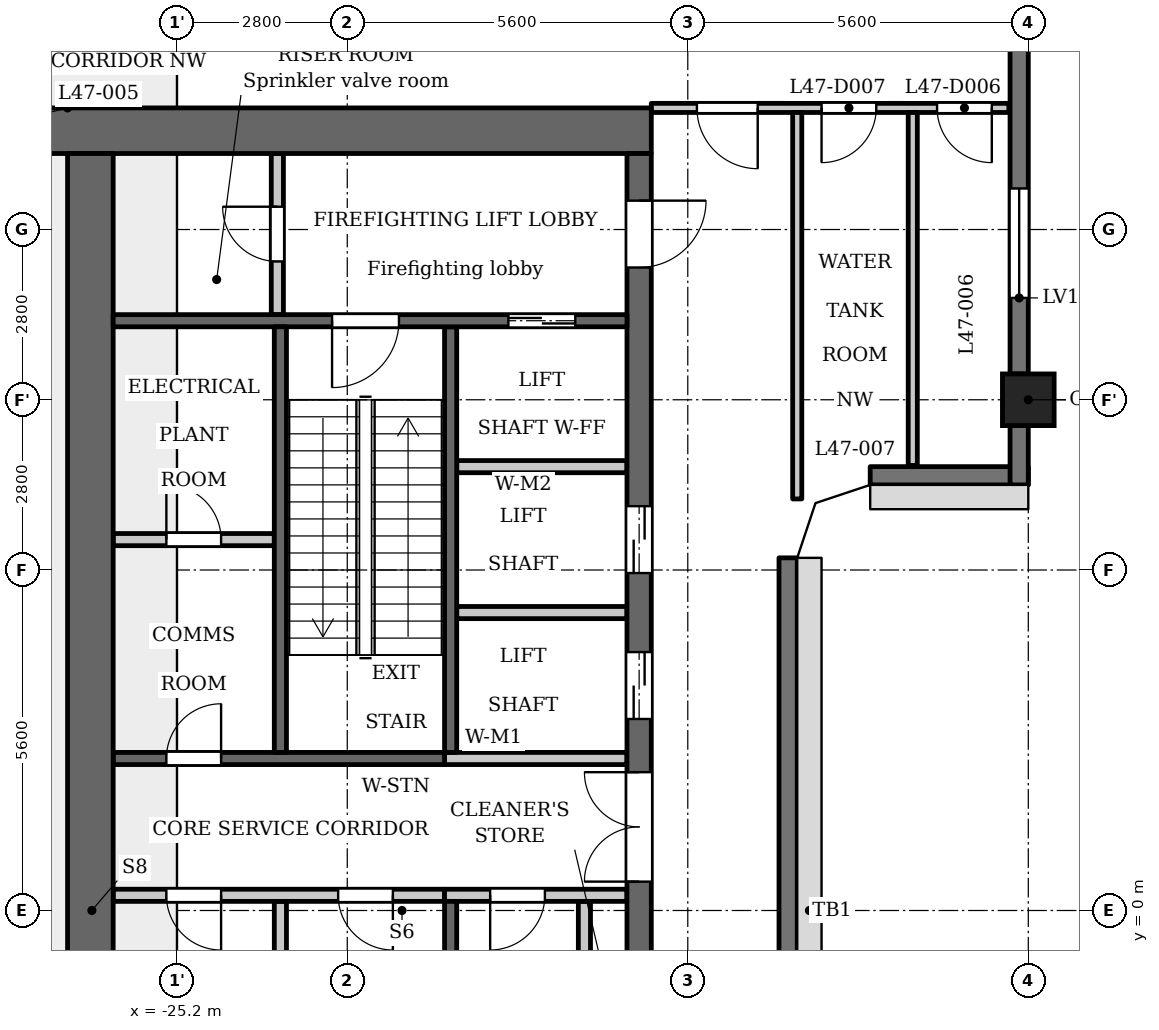
"""IFC4 building model, lengths in metres.
Left out: names, types, materials, properties, quantities, classifications, styles, units other than length and angle.
Written with IfcOpenShell. Run it as: python <this file> out.ifc"""

import sys

from ifc_helpers import new_model, si_unit, direction, frame, frame_2d, origin, origin_2d, place, context, subcontext, project, spatial, polyline, rectangle, outline, extrude, element, fill, save


model = new_model("IFC4")
c1 = context("Model", 3, precision=1e-05, world=origin(), true_north=direction((0.0, 1.0)))
c2 = subcontext(c1, "Body", "Model", "MODEL_VIEW")
j1 = project(units=[si_unit("LENGTHUNIT", "METRE"), si_unit("PLANEANGLEUNIT", "RADIAN")], contexts=[c1])
p1 = place(None, origin())
s1 = spatial("IfcSite", under=j1, at=p1, CompositionType="ELEMENT")
p2 = place(p1, origin())
s2 = spatial("IfcBuilding", under=s1, at=p2, CompositionType="ELEMENT")
p3 = place(p2, frame((0.0, 0.0, 183.5)))
s3 = spatial("IfcBuildingStorey", under=s2, at=p3, CompositionType="ELEMENT", Elevation=183.5)
p4 = place(p3, frame((-11.2, 8.4, 0.0), z_axis=(0.0, 0.0, 1.0), x_axis=(1.0, 0.0, 0.0)))
e1 = element("IfcColumn", 1, at=p4, inside=s3, PredefinedType="COLUMN", context=c2, shape_type="SweptSolid", body=[
    extrude(rectangle(XDim=0.85, YDim=0.85, at=origin_2d()), origin(), (0.0, 0.0, 1.0), 5.4),
])
p5 = place(p3, frame((-15.15, -5.8, 0.0), z_axis=(0.0, 0.0, 1.0), x_axis=(0.0, 1.0, 0.0)))
e2 = element("IfcWall", 2, at=p5, inside=s3, PredefinedType="SOLIDWALL", context=c2, shape_type="SweptSolid", body=[
    extrude(rectangle(XDim=11.6, YDim=0.3, at=frame_2d((5.8, 0.0))), origin(), (0.0, 0.0, 1.0), 4.6),
])
p6 = place(p3, frame((-13.8, 7.15, 0.0), z_axis=(0.0, 0.0, 1.0), x_axis=(1.0, 0.0, 0.0)))
e3 = element("IfcWall", 3, at=p6, inside=s3, PredefinedType="SOLIDWALL", context=c2, shape_type="SweptSolid", body=[
    extrude(rectangle(XDim=2.6, YDim=0.3, at=frame_2d((1.3, 0.0))), origin(), (0.0, 0.0, 1.0), 4.6),
])
p7 = place(p3, frame((-11.35, 7.0, 0.0), z_axis=(0.0, 0.0, 1.0), x_axis=(0.0, 1.0, 0.0)))
e4 = element("IfcWall", 4, at=p7, inside=s3, PredefinedType="SOLIDWALL", context=c2, shape_type="SweptSolid", body=[
    extrude(rectangle(XDim=0.975, YDim=0.3, at=frame_2d((0.488, 0.0))), origin(), (0.0, 0.0, 1.0), 4.6),
])
p8 = place(p3, frame((-11.35, 8.825, 0.0), z_axis=(0.0, 0.0, 1.0), x_axis=(0.0, 1.0, 0.0)))
e5 = element("IfcWall", 5, at=p8, inside=s3, PredefinedType="SOLIDWALL", context=c2, shape_type="SweptSolid", body=[
    extrude(rectangle(XDim=6.2, YDim=0.3, at=frame_2d((3.1, 0.0))), origin(), (0.0, 0.0, 1.0), 4.6),
])
p9 = place(p8, frame((1.25, 0.0, 0.9)))
e6 = element("IfcOpeningElement", 6, at=p9, cuts=e5, PredefinedType="OPENING", context=c2, shape_type="SweptSolid", body=[
    extrude(rectangle(XDim=1.8, YDim=1.5, at=frame_2d((0.9, 0.75))), frame((0.0, 0.16, 0.0), z_axis=(0.0, -1.0, 0.0), x_axis=(1.0, 0.0, 0.0)), (0.0, 0.0, 1.0), 0.32),
])
p10 = place(p3, frame((-23.5, -2.5, 0.0), z_axis=(0.0, 0.0, 1.0), x_axis=(0.0, 1.0, 0.0)))
e7 = element("IfcWall", 7, at=p10, inside=s3, PredefinedType="PARTITIONING", context=c2, shape_type="SweptSolid", body=[
    extrude(rectangle(XDim=2.65, YDim=0.2, at=frame_2d((1.325, 0.0))), origin(), (0.0, 0.0, 1.0), 4.6),
])
p11 = place(p3, frame((-20.7, 2.6, 0.0), z_axis=(0.0, 0.0, 1.0), x_axis=(0.0, 1.0, 0.0)))
e8 = element("IfcWall", 8, at=p11, inside=s3, PredefinedType="SHEAR", context=c2, shape_type="SweptSolid", body=[
    extrude(rectangle(XDim=7.0, YDim=0.2, at=frame_2d((3.5, 0.0))), origin(), (0.0, 0.0, 1.0), 4.6),
])
p12 = place(p3, frame((-20.7, -9.6, 0.0), z_axis=(0.0, 0.0, 1.0), x_axis=(0.0, 1.0, 0.0)))
e9 = element("IfcWall", 9, at=p12, inside=s3, PredefinedType="SHEAR", context=c2, shape_type="SweptSolid", body=[
    extrude(rectangle(XDim=9.75, YDim=0.2, at=frame_2d((4.875, 0.0))), origin(), (0.0, 0.0, 1.0), 4.6),
])
p13 = place(p3, frame((-20.8, 2.5, 0.0), z_axis=(0.0, 0.0, 1.0), x_axis=(-1.0, 0.0, 0.0)))
e10 = element("IfcWall", 10, at=p13, inside=s3, PredefinedType="SHEAR", context=c2, shape_type="SweptSolid", body=[
    extrude(rectangle(XDim=5.45, YDim=0.2, at=frame_2d((2.725, 0.0))), origin(), (0.0, 0.0, 1.0), 4.6),
])
p14 = place(p13, frame((3.675, 0.0, 0.0)))
e11 = element("IfcOpeningElement", 11, at=p14, cuts=e10, PredefinedType="OPENING", context=c2, shape_type="SweptSolid", body=[
    extrude(rectangle(XDim=0.9, YDim=2.1, at=frame_2d((0.45, 1.05))), frame((0.0, 0.11, 0.0), z_axis=(0.0, -1.0, 0.0), x_axis=(1.0, 0.0, 0.0)), (0.0, 0.0, 1.0), 0.22),
])
p15 = place(p3, frame((-20.8, 0.25, 0.0), z_axis=(0.0, 0.0, 1.0), x_axis=(-1.0, 0.0, 0.0)))
e12 = element("IfcWall", 12, at=p15, inside=s3, PredefinedType="PARTITIONING", context=c2, shape_type="SweptSolid", body=[
    extrude(rectangle(XDim=5.45, YDim=0.2, at=frame_2d((2.725, 0.0))), origin(), (0.0, 0.0, 1.0), 4.6),
])
p16 = place(p15, frame((0.85, 0.0, 0.0)))
e13 = element("IfcOpeningElement", 13, at=p16, cuts=e12, PredefinedType="OPENING", context=c2, shape_type="SweptSolid", body=[
    extrude(rectangle(XDim=0.9, YDim=2.1, at=frame_2d((0.45, 1.05))), frame((0.0, 0.11, 0.0), z_axis=(0.0, -1.0, 0.0), x_axis=(1.0, 0.0, 0.0)), (0.0, 0.0, 1.0), 0.22),
])
p17 = place(p15, frame((3.675, 0.0, 0.0)))
e14 = element("IfcOpeningElement", 14, at=p17, cuts=e12, PredefinedType="OPENING", context=c2, shape_type="SweptSolid", body=[
    extrude(rectangle(XDim=0.9, YDim=2.1, at=frame_2d((0.45, 1.05))), frame((0.0, 0.11, 0.0), z_axis=(0.0, -1.0, 0.0), x_axis=(1.0, 0.0, 0.0)), (0.0, 0.0, 1.0), 0.22),
])
p18 = place(p3, frame((-17.4, 12.825, 0.0), z_axis=(0.0, 0.0, 1.0), x_axis=(-1.0, 0.0, 0.0)))
e15 = element("IfcWall", 15, at=p18, inside=s3, PredefinedType="SHEAR", context=c2, shape_type="SweptSolid", body=[
    extrude(rectangle(XDim=10.4, YDim=0.75, at=frame_2d((5.2, 0.0))), origin(), (0.0, 0.0, 1.0), 4.6),
])
p19 = place(p3, frame((-18.5, -6.85, 0.0), z_axis=(0.0, 0.0, 1.0), x_axis=(0.0, 1.0, 0.0)))
e16 = element("IfcWall", 16, at=p19, inside=s3, PredefinedType="PARTITIONING", context=c2, shape_type="SweptSolid", body=[
    extrude(rectangle(XDim=7.0, YDim=0.2, at=frame_2d((3.5, 0.0))), origin(), (0.0, 0.0, 1.0), 4.6),
])
p20 = place(p3, frame((-17.6, -12.45, 0.0), z_axis=(0.0, 0.0, 1.0), x_axis=(0.0, 1.0, 0.0)))
e17 = element("IfcWall", 17, at=p20, inside=s3, PredefinedType="SHEAR", context=c2, shape_type="SweptSolid", body=[
    extrude(rectangle(XDim=24.9, YDim=0.4, at=frame_2d((12.45, 0.0))), origin(), (0.0, 0.0, 1.0), 4.6),
])
p21 = place(p20, frame((8.65, 0.0, 0.0)))
e18 = element("IfcOpeningElement", 18, at=p21, cuts=e17, PredefinedType="OPENING", context=c2, shape_type="SweptSolid", body=[
    extrude(rectangle(XDim=0.9, YDim=2.1, at=frame_2d((0.45, 1.05))), frame((0.0, 0.21, 0.0), z_axis=(0.0, -1.0, 0.0), x_axis=(1.0, 0.0, 0.0)), (0.0, 0.0, 1.0), 0.42),
])
p22 = place(p20, frame((15.6, 0.0, 0.0)))
e19 = element("IfcOpeningElement", 19, at=p22, cuts=e17, PredefinedType="OPENING", context=c2, shape_type="SweptSolid", body=[
    extrude(rectangle(XDim=1.1, YDim=2.1, at=frame_2d((0.55, 1.05))), frame((0.0, 0.21, 0.0), z_axis=(0.0, -1.0, 0.0), x_axis=(1.0, 0.0, 0.0)), (0.0, 0.0, 1.0), 0.42),
])
p23 = place(p20, frame((18.0, 0.0, 0.0)))
e20 = element("IfcOpeningElement", 20, at=p23, cuts=e17, PredefinedType="OPENING", context=c2, shape_type="SweptSolid", body=[
    extrude(rectangle(XDim=1.1, YDim=2.1, at=frame_2d((0.55, 1.05))), frame((0.0, 0.21, 0.0), z_axis=(0.0, -1.0, 0.0), x_axis=(1.0, 0.0, 0.0)), (0.0, 0.0, 1.0), 0.42),
])
p24 = place(p20, frame((23.025, 0.0, 0.0)))
e21 = element("IfcOpeningElement", 21, at=p24, cuts=e17, PredefinedType="OPENING", context=c2, shape_type="SweptSolid", body=[
    extrude(rectangle(XDim=1.1, YDim=2.1, at=frame_2d((0.55, 1.05))), frame((0.0, 0.21, 0.0), z_axis=(0.0, -1.0, 0.0), x_axis=(1.0, 0.0, 0.0)), (0.0, 0.0, 1.0), 0.42),
])
p25 = place(p20, frame((0.775, 0.0, 0.0)))
e22 = element("IfcOpeningElement", 22, at=p25, cuts=e17, PredefinedType="OPENING", context=c2, shape_type="SweptSolid", body=[
    extrude(rectangle(XDim=1.1, YDim=2.1, at=frame_2d((0.55, 1.05))), frame((0.0, 0.21, 0.0), z_axis=(0.0, -1.0, 0.0), x_axis=(1.0, 0.0, 0.0)), (0.0, 0.0, 1.0), 0.42),
])
p26 = place(p20, frame((12.925, 0.0, 0.0)))
e23 = element("IfcOpeningElement", 23, at=p26, cuts=e17, PredefinedType="OPENING", context=c2, shape_type="SweptSolid", body=[
    extrude(rectangle(XDim=1.8, YDim=2.1, at=frame_2d((0.9, 1.05))), frame((0.0, 0.21, 0.0), z_axis=(0.0, -1.0, 0.0), x_axis=(1.0, 0.0, 0.0)), (0.0, 0.0, 1.0), 0.42),
])
p27 = place(p3, frame((-26.625, -12.45, 0.0), z_axis=(0.0, 0.0, 1.0), x_axis=(0.0, 1.0, 0.0)))
e24 = element("IfcWall", 24, at=p27, inside=s3, PredefinedType="SHEAR", context=c2, shape_type="SweptSolid", body=[
    extrude(rectangle(XDim=24.9, YDim=0.75, at=frame_2d((12.45, 0.0))), origin(), (0.0, 0.0, 1.0), 4.6),
])
p28 = place(p3, frame((-23.55, 9.8, 0.0), z_axis=(0.0, 0.0, 1.0), x_axis=(0.0, 1.0, 0.0)))
e25 = element("IfcWall", 25, at=p28, inside=s3, PredefinedType="PARTITIONING", context=c2, shape_type="SweptSolid", body=[
    extrude(rectangle(XDim=2.65, YDim=0.2, at=frame_2d((1.325, 0.0))), origin(), (0.0, 0.0, 1.0), 4.6),
])
p29 = place(p28, frame((0.875, 0.0, 0.0)))
e26 = element("IfcOpeningElement", 26, at=p29, cuts=e25, PredefinedType="OPENING", context=c2, shape_type="SweptSolid", body=[
    extrude(rectangle(XDim=0.9, YDim=2.1, at=frame_2d((0.45, 1.05))), frame((0.0, 0.11, 0.0), z_axis=(0.0, -1.0, 0.0), x_axis=(1.0, 0.0, 0.0)), (0.0, 0.0, 1.0), 0.22),
])
p30 = place(p3, frame((-23.6, 6.1, 0.0), z_axis=(0.0, 0.0, 1.0), x_axis=(-1.0, 0.0, 0.0)))
e27 = element("IfcWall", 27, at=p30, inside=s3, PredefinedType="PARTITIONING", context=c2, shape_type="SweptSolid", body=[
    extrude(rectangle(XDim=2.65, YDim=0.2, at=frame_2d((1.325, 0.0))), origin(), (0.0, 0.0, 1.0), 4.6),
])
p31 = place(p30, frame((0.875, 0.0, 0.0)))
e28 = element("IfcOpeningElement", 28, at=p31, cuts=e27, PredefinedType="OPENING", context=c2, shape_type="SweptSolid", body=[
    extrude(rectangle(XDim=0.9, YDim=2.1, at=frame_2d((0.45, 1.05))), frame((0.0, 0.11, 0.0), z_axis=(0.0, -1.0, 0.0), x_axis=(1.0, 0.0, 0.0)), (0.0, 0.0, 1.0), 0.22),
])
p32 = place(p3, frame((-17.8, 0.25, 0.0), z_axis=(0.0, 0.0, 1.0), x_axis=(-1.0, 0.0, 0.0)))
e29 = element("IfcWall", 29, at=p32, inside=s3, PredefinedType="PARTITIONING", context=c2, shape_type="SweptSolid", body=[
    extrude(rectangle(XDim=3.0, YDim=0.2, at=frame_2d((1.5, 0.0))), origin(), (0.0, 0.0, 1.0), 4.6),
])
p33 = place(p32, frame((1.35, 0.0, 0.0)))
e30 = element("IfcOpeningElement", 30, at=p33, cuts=e29, PredefinedType="OPENING", context=c2, shape_type="SweptSolid", body=[
    extrude(rectangle(XDim=0.9, YDim=2.1, at=frame_2d((0.45, 1.05))), frame((0.0, 0.11, 0.0), z_axis=(0.0, -1.0, 0.0), x_axis=(1.0, 0.0, 0.0)), (0.0, 0.0, 1.0), 0.22),
])
p34 = place(p3, frame((-17.8, 2.5, 0.0), z_axis=(0.0, 0.0, 1.0), x_axis=(-1.0, 0.0, 0.0)))
e31 = element("IfcWall", 31, at=p34, inside=s3, PredefinedType="PARTITIONING", context=c2, shape_type="SweptSolid", body=[
    extrude(rectangle(XDim=3.0, YDim=0.2, at=frame_2d((1.5, 0.0))), origin(), (0.0, 0.0, 1.0), 4.6),
])
for number, where, z_axis, x_axis in (
    (32, (-17.8, 4.9, 0.0), (0.0, 0.0, 1.0), (-1.0, 0.0, 0.0)),
    (33, (-17.8, 7.3, 0.0), (0.0, 0.0, 1.0), (-1.0, 0.0, 0.0)),
):
    element("IfcWall", number, at=place(p3, frame(where, z_axis=z_axis, x_axis=x_axis)), inside=s3, PredefinedType="PARTITIONING", context=c2, shape_type="SweptSolid", body=[
        extrude(rectangle(XDim=2.8, YDim=0.2, at=frame_2d((1.4, 0.0))), origin(), (0.0, 0.0, 1.0), 4.6),
    ])
p35 = place(p3, frame((-17.8, 9.7, 0.0), z_axis=(0.0, 0.0, 1.0), x_axis=(-1.0, 0.0, 0.0)))
e34 = element("IfcWall", 34, at=p35, inside=s3, PredefinedType="SHEAR", context=c2, shape_type="SweptSolid", body=[
    extrude(rectangle(XDim=8.45, YDim=0.2, at=frame_2d((4.225, 0.0))), origin(), (0.0, 0.0, 1.0), 4.6),
])
p36 = place(p35, frame((0.85, 0.0, 0.0)))
e35 = element("IfcOpeningElement", 35, at=p36, cuts=e34, PredefinedType="OPENING", context=c2, shape_type="SweptSolid", body=[
    extrude(rectangle(XDim=1.1, YDim=2.1, at=frame_2d((0.55, 1.05))), frame((0.0, 0.11, 0.0), z_axis=(0.0, -1.0, 0.0), x_axis=(1.0, 0.0, 0.0)), (0.0, 0.0, 1.0), 0.22),
])
p37 = place(p35, frame((3.75, 0.0, 0.0)))
e36 = element("IfcOpeningElement", 36, at=p37, cuts=e34, PredefinedType="OPENING", context=c2, shape_type="SweptSolid", body=[
    extrude(rectangle(XDim=1.1, YDim=2.1, at=frame_2d((0.55, 1.05))), frame((0.0, 0.11, 0.0), z_axis=(0.0, -1.0, 0.0), x_axis=(1.0, 0.0, 0.0)), (0.0, 0.0, 1.0), 0.22),
])
p38 = place(p3, frame((-23.5, 2.6, 0.0), z_axis=(0.0, 0.0, 1.0), x_axis=(0.0, 1.0, 0.0)))
e37 = element("IfcWall", 37, at=p38, inside=s3, PredefinedType="SHEAR", context=c2, shape_type="SweptSolid", body=[
    extrude(rectangle(XDim=7.0, YDim=0.2, at=frame_2d((3.5, 0.0))), origin(), (0.0, 0.0, 1.0), 4.6),
])
p39 = place(p3, frame((-17.4, 13.2, 0.0), z_axis=(0.0, 0.0, 1.0), x_axis=(1.0, 0.0, 0.0)))
e38 = element("IfcWall", 38, at=p39, inside=s3, PredefinedType="PARTITIONING", context=c2, shape_type="SweptSolid", body=[
    extrude(rectangle(XDim=5.88, YDim=0.15, at=frame_2d((2.94, 0.0))), origin(), (0.0, 0.0, 1.0), 4.6),
])
p40 = place(p39, frame((0.75, 0.0, 0.0)))
e39 = element("IfcOpeningElement", 39, at=p40, cuts=e38, PredefinedType="OPENING", context=c2, shape_type="SweptSolid", body=[
    extrude(rectangle(XDim=1.0, YDim=2.1, at=frame_2d((0.5, 1.05))), frame((0.0, 0.085, 0.0), z_axis=(0.0, -1.0, 0.0), x_axis=(1.0, 0.0, 0.0)), (0.0, 0.0, 1.0), 0.17),
])
p41 = place(p39, frame((4.7, 0.0, 0.0)))
e40 = element("IfcOpeningElement", 40, at=p41, cuts=e38, PredefinedType="OPENING", context=c2, shape_type="SweptSolid", body=[
    extrude(rectangle(XDim=0.9, YDim=2.1, at=frame_2d((0.45, 1.05))), frame((0.0, 0.085, 0.0), z_axis=(0.0, -1.0, 0.0), x_axis=(1.0, 0.0, 0.0)), (0.0, 0.0, 1.0), 0.17),
])
p42 = place(p39, frame((2.8, 0.0, 0.0)))
e41 = element("IfcOpeningElement", 41, at=p42, cuts=e38, PredefinedType="OPENING", context=c2, shape_type="SweptSolid", body=[
    extrude(rectangle(XDim=0.9, YDim=2.1, at=frame_2d((0.45, 1.05))), frame((0.0, 0.085, 0.0), z_axis=(0.0, -1.0, 0.0), x_axis=(1.0, 0.0, 0.0)), (0.0, 0.0, 1.0), 0.17),
])
p43 = place(p3, frame((-15.0, 6.769, 0.0), z_axis=(0.0, 0.0, 1.0), x_axis=(0.0, 1.0, 0.0)))
e42 = element("IfcWall", 42, at=p43, inside=s3, PredefinedType="PARTITIONING", context=c2, shape_type="SweptSolid", body=[
    extrude(rectangle(XDim=6.356, YDim=0.15, at=frame_2d((3.178, 0.0))), origin(), (0.0, 0.0, 1.0), 4.6),
])
p44 = place(p3, frame((-13.1, 7.32, 0.0), z_axis=(0.0, 0.0, 1.0), x_axis=(0.0, 1.0, 0.0)))
e43 = element("IfcWall", 43, at=p44, inside=s3, PredefinedType="PARTITIONING", context=c2, shape_type="SweptSolid", body=[
    extrude(rectangle(XDim=5.805, YDim=0.15, at=frame_2d((2.902, 0.0))), origin(), (0.0, 0.0, 1.0), 4.6),
])
p45 = place(p3, origin())
e44 = element("IfcWall", 44, at=p45, inside=s3, PredefinedType="SOLIDWALL", context=c2, shape_type="SweptSolid", body=[
    extrude(outline(polyline([(-15.0, 5.8), (-14.7, 6.7), (-13.8, 7.0), (-13.8, 7.3), (-13.849, 7.3), (-14.937, 6.937), (-15.3, 5.849), (-15.3, 5.8), (-15.0, 5.8)])), origin(), (0.0, 0.0, 1.0), 4.6),
])
p46 = place(p33, origin())
e45 = element("IfcDoor", 45, at=p46, inside=s3, OperationType="SINGLE_SWING_LEFT", PredefinedType="DOOR", context=c2, shape_type="SweptSolid", body=[
    extrude(rectangle(XDim=0.9, YDim=2.1, at=frame_2d((0.45, 1.05))), frame((0.0, 0.025, 0.0), z_axis=(0.0, -1.0, 0.0), x_axis=(1.0, 0.0, 0.0)), (0.0, 0.0, 1.0), 0.05),
])
fill(e30, e45)
p47 = place(p22, origin())
e46 = element("IfcDoor", 46, at=p47, inside=s3, OperationType="DOUBLE_DOOR_SLIDING", PredefinedType="DOOR", context=c2, shape_type="SweptSolid", body=[
    extrude(rectangle(XDim=1.1, YDim=2.1, at=frame_2d((0.55, 1.05))), frame((0.0, 0.025, 0.0), z_axis=(0.0, -1.0, 0.0), x_axis=(1.0, 0.0, 0.0)), (0.0, 0.0, 1.0), 0.05),
])
fill(e19, e46)
p48 = place(p23, origin())
e47 = element("IfcDoor", 47, at=p48, inside=s3, OperationType="DOUBLE_DOOR_SLIDING", PredefinedType="DOOR", context=c2, shape_type="SweptSolid", body=[
    extrude(rectangle(XDim=1.1, YDim=2.1, at=frame_2d((0.55, 1.05))), frame((0.0, 0.025, 0.0), z_axis=(0.0, -1.0, 0.0), x_axis=(1.0, 0.0, 0.0)), (0.0, 0.0, 1.0), 0.05),
])
fill(e20, e47)
p49 = place(p36, origin())
e48 = element("IfcDoor", 48, at=p49, inside=s3, OperationType="DOUBLE_DOOR_SLIDING", PredefinedType="DOOR", context=c2, shape_type="SweptSolid", body=[
    extrude(rectangle(XDim=1.1, YDim=2.1, at=frame_2d((0.55, 1.05))), frame((0.0, 0.025, 0.0), z_axis=(0.0, -1.0, 0.0), x_axis=(1.0, 0.0, 0.0)), (0.0, 0.0, 1.0), 0.05),
])
fill(e35, e48)
p50 = place(p24, origin())
e49 = element("IfcDoor", 49, at=p50, inside=s3, OperationType="SINGLE_SWING_RIGHT", PredefinedType="DOOR", context=c2, shape_type="SweptSolid", body=[
    extrude(rectangle(XDim=1.1, YDim=2.1, at=frame_2d((0.55, 1.05))), frame((0.0, 0.025, 0.0), z_axis=(0.0, -1.0, 0.0), x_axis=(1.0, 0.0, 0.0)), (0.0, 0.0, 1.0), 0.05),
])
fill(e21, e49)
p51 = place(p29, origin())
e50 = element("IfcDoor", 50, at=p51, inside=s3, OperationType="SINGLE_SWING_LEFT", PredefinedType="DOOR", context=c2, shape_type="SweptSolid", body=[
    extrude(rectangle(XDim=0.9, YDim=2.1, at=frame_2d((0.45, 1.05))), frame((0.0, 0.025, 0.0), z_axis=(0.0, -1.0, 0.0), x_axis=(1.0, 0.0, 0.0)), (0.0, 0.0, 1.0), 0.05),
])
fill(e26, e50)
p52 = place(p37, origin())
e51 = element("IfcDoor", 51, at=p52, inside=s3, OperationType="SINGLE_SWING_LEFT", PredefinedType="DOOR", context=c2, shape_type="SweptSolid", body=[
    extrude(rectangle(XDim=1.1, YDim=2.1, at=frame_2d((0.55, 1.05))), frame((0.0, 0.025, 0.0), z_axis=(0.0, -1.0, 0.0), x_axis=(1.0, 0.0, 0.0)), (0.0, 0.0, 1.0), 0.05),
])
fill(e36, e51)
p53 = place(p26, origin())
e52 = element("IfcDoor", 52, at=p53, inside=s3, OperationType="DOUBLE_DOOR_SINGLE_SWING", PredefinedType="DOOR", context=c2, shape_type="SweptSolid", body=[
    extrude(rectangle(XDim=1.8, YDim=2.1, at=frame_2d((0.9, 1.05))), frame((0.0, 0.025, 0.0), z_axis=(0.0, -1.0, 0.0), x_axis=(1.0, 0.0, 0.0)), (0.0, 0.0, 1.0), 0.05),
])
fill(e23, e52)
p54 = place(p16, origin())
e53 = element("IfcDoor", 53, at=p54, inside=s3, OperationType="SINGLE_SWING_RIGHT", PredefinedType="DOOR", context=c2, shape_type="SweptSolid", body=[
    extrude(rectangle(XDim=0.9, YDim=2.1, at=frame_2d((0.45, 1.05))), frame((0.0, 0.025, 0.0), z_axis=(0.0, -1.0, 0.0), x_axis=(1.0, 0.0, 0.0)), (0.0, 0.0, 1.0), 0.05),
])
fill(e13, e53)
p55 = place(p17, origin())
e54 = element("IfcDoor", 54, at=p55, inside=s3, OperationType="SINGLE_SWING_RIGHT", PredefinedType="DOOR", context=c2, shape_type="SweptSolid", body=[
    extrude(rectangle(XDim=0.9, YDim=2.1, at=frame_2d((0.45, 1.05))), frame((0.0, 0.025, 0.0), z_axis=(0.0, -1.0, 0.0), x_axis=(1.0, 0.0, 0.0)), (0.0, 0.0, 1.0), 0.05),
])
fill(e14, e54)
p56 = place(p31, origin())
e55 = element("IfcDoor", 55, at=p56, inside=s3, OperationType="SINGLE_SWING_RIGHT", PredefinedType="DOOR", context=c2, shape_type="SweptSolid", body=[
    extrude(rectangle(XDim=0.9, YDim=2.1, at=frame_2d((0.45, 1.05))), frame((0.0, 0.025, 0.0), z_axis=(0.0, -1.0, 0.0), x_axis=(1.0, 0.0, 0.0)), (0.0, 0.0, 1.0), 0.05),
])
fill(e28, e55)
p57 = place(p14, origin())
e56 = element("IfcDoor", 56, at=p57, inside=s3, OperationType="SINGLE_SWING_LEFT", PredefinedType="DOOR", context=c2, shape_type="SweptSolid", body=[
    extrude(rectangle(XDim=0.9, YDim=2.1, at=frame_2d((0.45, 1.05))), frame((0.0, 0.025, 0.0), z_axis=(0.0, -1.0, 0.0), x_axis=(1.0, 0.0, 0.0)), (0.0, 0.0, 1.0), 0.05),
])
fill(e11, e56)
p58 = place(p40, origin())
e57 = element("IfcDoor", 57, at=p58, inside=s3, OperationType="SINGLE_SWING_RIGHT", PredefinedType="DOOR", context=c2, shape_type="SweptSolid", body=[
    extrude(rectangle(XDim=1.0, YDim=2.1, at=frame_2d((0.5, 1.05))), frame((0.0, 0.025, 0.0), z_axis=(0.0, -1.0, 0.0), x_axis=(1.0, 0.0, 0.0)), (0.0, 0.0, 1.0), 0.05),
])
fill(e39, e57)
p59 = place(p41, origin())
e58 = element("IfcDoor", 58, at=p59, inside=s3, OperationType="SINGLE_SWING_RIGHT", PredefinedType="DOOR", context=c2, shape_type="SweptSolid", body=[
    extrude(rectangle(XDim=0.9, YDim=2.1, at=frame_2d((0.45, 1.05))), frame((0.0, 0.025, 0.0), z_axis=(0.0, -1.0, 0.0), x_axis=(1.0, 0.0, 0.0)), (0.0, 0.0, 1.0), 0.05),
])
fill(e40, e58)
p60 = place(p42, origin())
e59 = element("IfcDoor", 59, at=p60, inside=s3, OperationType="SINGLE_SWING_LEFT", PredefinedType="DOOR", context=c2, shape_type="SweptSolid", body=[
    extrude(rectangle(XDim=0.9, YDim=2.1, at=frame_2d((0.45, 1.05))), frame((0.0, 0.025, 0.0), z_axis=(0.0, -1.0, 0.0), x_axis=(1.0, 0.0, 0.0)), (0.0, 0.0, 1.0), 0.05),
])
fill(e41, e59)
p61 = place(p9, origin())
e60 = element("IfcWindow", 60, at=p61, inside=s3, PartitioningType="SINGLE_PANEL", PredefinedType="WINDOW", context=c2, shape_type="SweptSolid", body=[
    extrude(rectangle(XDim=1.8, YDim=1.5, at=frame_2d((0.9, 0.75))), frame((0.0, 0.03, 0.0), z_axis=(0.0, -1.0, 0.0), x_axis=(1.0, 0.0, 0.0)), (0.0, 0.0, 1.0), 0.06),
])
fill(e6, e60)
save(model, sys.argv[1])
